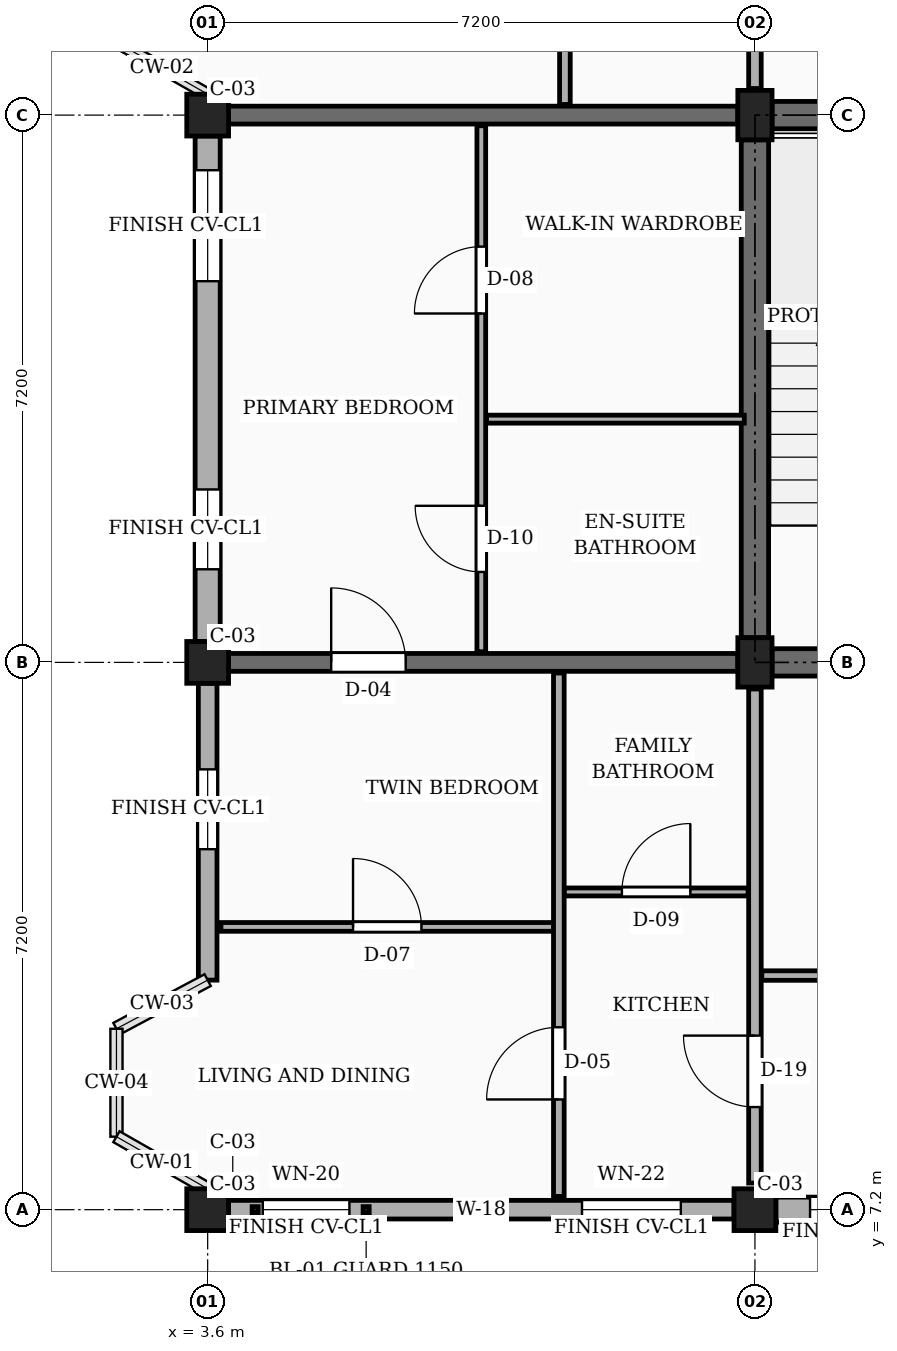
"""IFC4 building model, lengths in metres.
Left out: names, types, materials, properties, quantities, classifications, styles, units other than length and angle.
Written with IfcOpenShell. Run it as: python <this file> out.ifc"""

import sys

from ifc_helpers import new_model, si_unit, direction, frame, frame_2d, origin, origin_2d, place, context, subcontext, project, spatial, rectangle, extrude, element, fill, save


model = new_model("IFC4")
c1 = context("Model", 3, precision=1e-05, world=origin(), true_north=direction((0.0, 1.0)))
c2 = subcontext(c1, "Body", "Model", "MODEL_VIEW")
j1 = project(units=[si_unit("LENGTHUNIT", "METRE"), si_unit("PLANEANGLEUNIT", "RADIAN")], contexts=[c1])
p1 = place(None, origin())
s1 = spatial("IfcSite", under=j1, at=p1, CompositionType="ELEMENT")
p2 = place(p1, origin())
s2 = spatial("IfcBuilding", under=s1, at=p2, CompositionType="ELEMENT")
p3 = place(p2, frame((0.0, 0.0, 20.25)))
s3 = spatial("IfcBuildingStorey", under=s2, at=p3, CompositionType="ELEMENT", Elevation=20.25)
for number, where, z_axis, x_axis in (
    (1, (3.6, 7.2, 0.0), (0.0, 0.0, 1.0), (1.0, 0.0, 0.0)),
    (2, (3.6, 14.4, 0.0), (0.0, 0.0, 1.0), (1.0, 0.0, 0.0)),
    (3, (3.6, 21.6, 0.0), (0.0, 0.0, 1.0), (1.0, 0.0, 0.0)),
    (4, (10.8, 7.2, 0.0), (0.0, 0.0, 1.0), (1.0, 0.0, 0.0)),
):
    element("IfcColumn", number, at=place(p3, frame(where, z_axis=z_axis, x_axis=x_axis)), inside=s3, PredefinedType="COLUMN", context=c2, shape_type="SweptSolid", body=[
        extrude(rectangle(XDim=0.55, YDim=0.55, at=origin_2d()), origin(), (0.0, 0.0, 1.0), 3.15),
    ])
for number, where, z_axis, x_axis in (
    (5, (10.8, 14.4, 0.0), (0.0, 0.0, 1.0), (1.0, 0.0, 0.0)),
    (6, (10.8, 21.6, 0.0), (0.0, 0.0, 1.0), (1.0, 0.0, 0.0)),
):
    element("IfcColumn", number, at=place(p3, frame(where, z_axis=z_axis, x_axis=x_axis)), inside=s3, PredefinedType="COLUMN", context=c2, shape_type="SweptSolid", body=[
        extrude(rectangle(XDim=0.45, YDim=0.65, at=origin_2d()), origin(), (0.0, 0.0, 1.0), 3.15),
    ])
p4 = place(p3, frame((3.875, 14.4, 0.0), z_axis=(0.0, 0.0, 1.0), x_axis=(1.0, 0.0, 0.0)))
e7 = element("IfcWall", 7, at=p4, inside=s3, PredefinedType="SOLIDWALL", context=c2, shape_type="SweptSolid", body=[
    extrude(rectangle(XDim=6.7, YDim=0.235, at=frame_2d((3.35, 0.0))), origin(), (0.0, 0.0, 1.0), 2.17),
])
p5 = place(p4, frame((1.35, 0.0, 0.0)))
e8 = element("IfcOpeningElement", 8, at=p5, cuts=e7, PredefinedType="OPENING", context=c2, shape_type="SweptSolid", body=[
    extrude(rectangle(XDim=0.98, YDim=2.12, at=frame_2d((0.49, 1.06))), frame((0.0, 0.127, 0.0), z_axis=(0.0, -1.0, 0.0), x_axis=(1.0, 0.0, 0.0)), (0.0, 0.0, 1.0), 0.255),
])
p6 = place(p3, frame((3.875, 21.6, 0.0), z_axis=(0.0, 0.0, 1.0), x_axis=(1.0, 0.0, 0.0)))
e9 = element("IfcWall", 9, at=p6, inside=s3, PredefinedType="SOLIDWALL", context=c2, shape_type="SweptSolid", body=[
    extrude(rectangle(XDim=6.7, YDim=0.235, at=frame_2d((3.35, 0.0))), origin(), (0.0, 0.0, 1.0), 2.17),
])
p7 = place(p3, frame((3.875, 7.2, 0.0), z_axis=(0.0, 0.0, 1.0), x_axis=(1.0, 0.0, 0.0)))
e10 = element("IfcWall", 10, at=p7, inside=s3, PredefinedType="SOLIDWALL", context=c2, shape_type="SweptSolid", body=[
    extrude(rectangle(XDim=6.65, YDim=0.245, at=frame_2d((3.325, 0.0))), origin(), (0.0, 0.0, 1.0), 2.44),
])
p8 = place(p7, frame((0.45, 0.0, 0.78)))
e11 = element("IfcOpeningElement", 11, at=p8, cuts=e10, PredefinedType="OPENING", context=c2, shape_type="SweptSolid", body=[
    extrude(rectangle(XDim=1.14, YDim=1.36, at=frame_2d((0.57, 0.68))), frame((0.0, 0.133, 0.0), z_axis=(0.0, -1.0, 0.0), x_axis=(1.0, 0.0, 0.0)), (0.0, 0.0, 1.0), 0.265),
])
p9 = place(p7, frame((4.65, 0.0, 0.78)))
e12 = element("IfcOpeningElement", 12, at=p9, cuts=e10, PredefinedType="OPENING", context=c2, shape_type="SweptSolid", body=[
    extrude(rectangle(XDim=1.3, YDim=1.36, at=frame_2d((0.65, 0.68))), frame((0.0, 0.133, 0.0), z_axis=(0.0, -1.0, 0.0), x_axis=(1.0, 0.0, 0.0)), (0.0, 0.0, 1.0), 0.265),
])
p10 = place(p3, frame((11.075, 7.2, 0.0), z_axis=(0.0, 0.0, 1.0), x_axis=(1.0, 0.0, 0.0)))
e13 = element("IfcWall", 13, at=p10, inside=s3, PredefinedType="SOLIDWALL", context=c2, shape_type="SweptSolid", body=[
    extrude(rectangle(XDim=6.65, YDim=0.33, at=frame_2d((3.325, 0.0))), origin(), (0.0, 0.0, 1.0), 2.44),
])
p11 = place(p10, frame((0.45, 0.0, 0.78)))
e14 = element("IfcOpeningElement", 14, at=p11, cuts=e13, PredefinedType="OPENING", context=c2, shape_type="SweptSolid", body=[
    extrude(rectangle(XDim=1.3, YDim=1.36, at=frame_2d((0.65, 0.68))), frame((0.0, 0.175, 0.0), z_axis=(0.0, -1.0, 0.0), x_axis=(1.0, 0.0, 0.0)), (0.0, 0.0, 1.0), 0.35),
])
p12 = place(p10, frame((4.65, 0.0, 0.78)))
e15 = element("IfcOpeningElement", 15, at=p12, cuts=e13, PredefinedType="OPENING", context=c2, shape_type="SweptSolid", body=[
    extrude(rectangle(XDim=1.46, YDim=1.36, at=frame_2d((0.73, 0.68))), frame((0.0, 0.175, 0.0), z_axis=(0.0, -1.0, 0.0), x_axis=(1.0, 0.0, 0.0)), (0.0, 0.0, 1.0), 0.35),
])
p13 = place(p3, frame((3.6, 21.325, 0.0), z_axis=(0.0, 0.0, 1.0), x_axis=(0.0, -1.0, 0.0)))
e16 = element("IfcWall", 16, at=p13, inside=s3, PredefinedType="SOLIDWALL", context=c2, shape_type="SweptSolid", body=[
    extrude(rectangle(XDim=6.65, YDim=0.33, at=frame_2d((3.325, 0.0))), origin(), (0.0, 0.0, 1.0), 2.44),
])
p14 = place(p13, frame((0.45, 0.0, 0.78)))
e17 = element("IfcOpeningElement", 17, at=p14, cuts=e16, PredefinedType="OPENING", context=c2, shape_type="SweptSolid", body=[
    extrude(rectangle(XDim=1.46, YDim=1.36, at=frame_2d((0.73, 0.68))), frame((0.0, 0.175, 0.0), z_axis=(0.0, -1.0, 0.0), x_axis=(1.0, 0.0, 0.0)), (0.0, 0.0, 1.0), 0.35),
])
p15 = place(p13, frame((4.65, 0.0, 0.78)))
e18 = element("IfcOpeningElement", 18, at=p15, cuts=e16, PredefinedType="OPENING", context=c2, shape_type="SweptSolid", body=[
    extrude(rectangle(XDim=1.05, YDim=1.44, at=frame_2d((0.525, 0.72))), frame((0.0, 0.175, 0.0), z_axis=(0.0, -1.0, 0.0), x_axis=(1.0, 0.0, 0.0)), (0.0, 0.0, 1.0), 0.35),
])
p16 = place(p3, frame((3.6, 14.125, 0.0), z_axis=(0.0, 0.0, 1.0), x_axis=(0.0, -1.0, 0.0)))
e19 = element("IfcWall", 19, at=p16, inside=s3, PredefinedType="SOLIDWALL", context=c2, shape_type="SweptSolid", body=[
    extrude(rectangle(XDim=3.905, YDim=0.245, at=frame_2d((1.953, 0.0))), origin(), (0.0, 0.0, 1.0), 2.44),
])
p17 = place(p16, frame((1.133, 0.0, 0.78)))
e20 = element("IfcOpeningElement", 20, at=p17, cuts=e19, PredefinedType="OPENING", context=c2, shape_type="SweptSolid", body=[
    extrude(rectangle(XDim=1.05, YDim=1.44, at=frame_2d((0.525, 0.72))), frame((0.0, 0.133, 0.0), z_axis=(0.0, -1.0, 0.0), x_axis=(1.0, 0.0, 0.0)), (0.0, 0.0, 1.0), 0.265),
])
p18 = place(p3, frame((10.8, 14.725, 0.0), z_axis=(0.0, 0.0, 1.0), x_axis=(0.0, 1.0, 0.0)))
e21 = element("IfcWall", 21, at=p18, inside=s3, PredefinedType="SHEAR", context=c2, shape_type="SweptSolid", body=[
    extrude(rectangle(XDim=6.55, YDim=0.36, at=frame_2d((3.275, 0.0))), origin(), (0.0, 0.0, 1.0), 2.87),
])
for number, where, z_axis, x_axis in (
    (22, (11.025, 21.6, 0.0), (0.0, 0.0, 1.0), (1.0, 0.0, 0.0)),
    (23, (11.025, 14.4, 0.0), (0.0, 0.0, 1.0), (1.0, 0.0, 0.0)),
):
    element("IfcWall", number, at=place(p3, frame(where, z_axis=z_axis, x_axis=x_axis)), inside=s3, PredefinedType="SHEAR", context=c2, shape_type="SweptSolid", body=[
        extrude(rectangle(XDim=6.75, YDim=0.36, at=frame_2d((3.375, 0.0))), origin(), (0.0, 0.0, 1.0), 2.87),
    ])
p19 = place(p3, frame((10.8, 7.55, 0.0), z_axis=(0.0, 0.0, 1.0), x_axis=(0.0, 1.0, 0.0)))
e24 = element("IfcWall", 24, at=p19, inside=s3, PredefinedType="PARTITIONING", context=c2, shape_type="SweptSolid", body=[
    extrude(rectangle(XDim=6.5, YDim=0.165, at=frame_2d((3.25, 0.0))), origin(), (0.0, 0.0, 1.0), 2.305),
])
p20 = place(p19, frame((1.0, 0.0, 0.0)))
e25 = element("IfcOpeningElement", 25, at=p20, cuts=e24, PredefinedType="OPENING", context=c2, shape_type="SweptSolid", body=[
    extrude(rectangle(XDim=0.94, YDim=2.12, at=frame_2d((0.47, 1.06))), frame((0.0, 0.093, 0.0), z_axis=(0.0, -1.0, 0.0), x_axis=(1.0, 0.0, 0.0)), (0.0, 0.0, 1.0), 0.185),
])
p21 = place(p3, frame((10.8, 21.95, 0.0), z_axis=(0.0, 0.0, 1.0), x_axis=(0.0, 1.0, 0.0)))
e26 = element("IfcWall", 26, at=p21, inside=s3, PredefinedType="PARTITIONING", context=c2, shape_type="SweptSolid", body=[
    extrude(rectangle(XDim=6.5, YDim=0.165, at=frame_2d((3.25, 0.0))), origin(), (0.0, 0.0, 1.0), 2.305),
])
p22 = place(p21, frame((1.0, 0.0, 0.0)))
e27 = element("IfcOpeningElement", 27, at=p22, cuts=e26, PredefinedType="OPENING", context=c2, shape_type="SweptSolid", body=[
    extrude(rectangle(XDim=1.14, YDim=2.18, at=frame_2d((0.57, 1.09))), frame((0.0, 0.093, 0.0), z_axis=(0.0, -1.0, 0.0), x_axis=(1.0, 0.0, 0.0)), (0.0, 0.0, 1.0), 0.185),
])
p23 = place(p3, frame((10.89, 10.28, 0.0), z_axis=(0.0, 0.0, 1.0), x_axis=(1.0, 0.0, 0.0)))
e28 = element("IfcWall", 28, at=p23, inside=s3, PredefinedType="PARTITIONING", context=c2, shape_type="SweptSolid", body=[
    extrude(rectangle(XDim=7.02, YDim=0.125, at=frame_2d((3.51, 0.0))), origin(), (0.0, 0.0, 1.0), 2.305),
])
p24 = place(p23, frame((2.85, 0.0, 0.0)))
e29 = element("IfcOpeningElement", 29, at=p24, cuts=e28, PredefinedType="OPENING", context=c2, shape_type="SweptSolid", body=[
    extrude(rectangle(XDim=1.02, YDim=2.15, at=frame_2d((0.51, 1.075))), frame((0.0, 0.073, 0.0), z_axis=(0.0, -1.0, 0.0), x_axis=(1.0, 0.0, 0.0)), (0.0, 0.0, 1.0), 0.145),
])
p25 = place(p3, frame((3.775, 10.92, 0.0), z_axis=(0.0, 0.0, 1.0), x_axis=(1.0, 0.0, 0.0)))
e30 = element("IfcWall", 30, at=p25, inside=s3, PredefinedType="PARTITIONING", context=c2, shape_type="SweptSolid", body=[
    extrude(rectangle(XDim=4.375, YDim=0.115, at=frame_2d((2.188, 0.0))), origin(), (0.0, 0.0, 1.0), 2.305),
])
p26 = place(p25, frame((1.738, 0.0, 0.0)))
e31 = element("IfcOpeningElement", 31, at=p26, cuts=e30, PredefinedType="OPENING", context=c2, shape_type="SweptSolid", body=[
    extrude(rectangle(XDim=0.9, YDim=2.1, at=frame_2d((0.45, 1.05))), frame((0.0, 0.067, 0.0), z_axis=(0.0, -1.0, 0.0), x_axis=(1.0, 0.0, 0.0)), (0.0, 0.0, 1.0), 0.135),
])
p27 = place(p3, frame((8.29, 11.38, 0.0), z_axis=(0.0, 0.0, 1.0), x_axis=(1.0, 0.0, 0.0)))
e32 = element("IfcWall", 32, at=p27, inside=s3, PredefinedType="PARTITIONING", context=c2, shape_type="SweptSolid", body=[
    extrude(rectangle(XDim=2.42, YDim=0.105, at=frame_2d((1.21, 0.0))), origin(), (0.0, 0.0, 1.0), 2.305),
])
p28 = place(p27, frame((0.76, 0.0, 0.0)))
e33 = element("IfcOpeningElement", 33, at=p28, cuts=e32, PredefinedType="OPENING", context=c2, shape_type="SweptSolid", body=[
    extrude(rectangle(XDim=0.9, YDim=2.05, at=frame_2d((0.45, 1.025))), frame((0.0, 0.062, 0.0), z_axis=(0.0, -1.0, 0.0), x_axis=(1.0, 0.0, 0.0)), (0.0, 0.0, 1.0), 0.125),
])
p29 = place(p3, frame((8.22, 7.375, 0.0), z_axis=(0.0, 0.0, 1.0), x_axis=(0.0, 1.0, 0.0)))
e34 = element("IfcWall", 34, at=p29, inside=s3, PredefinedType="PARTITIONING", context=c2, shape_type="SweptSolid", body=[
    extrude(rectangle(XDim=6.885, YDim=0.14, at=frame_2d((3.442, 0.0))), origin(), (0.0, 0.0, 1.0), 2.305),
])
p30 = place(p29, frame((1.275, 0.0, 0.0)))
e35 = element("IfcOpeningElement", 35, at=p30, cuts=e34, PredefinedType="OPENING", context=c2, shape_type="SweptSolid", body=[
    extrude(rectangle(XDim=0.95, YDim=2.1, at=frame_2d((0.475, 1.05))), frame((0.0, 0.08, 0.0), z_axis=(0.0, -1.0, 0.0), x_axis=(1.0, 0.0, 0.0)), (0.0, 0.0, 1.0), 0.16),
])
p31 = place(p3, frame((7.2, 14.54, 0.0), z_axis=(0.0, 0.0, 1.0), x_axis=(0.0, 1.0, 0.0)))
e36 = element("IfcWall", 36, at=p31, inside=s3, PredefinedType="PARTITIONING", context=c2, shape_type="SweptSolid", body=[
    extrude(rectangle(XDim=6.92, YDim=0.115, at=frame_2d((3.46, 0.0))), origin(), (0.0, 0.0, 1.0), 2.305),
])
p32 = place(p31, frame((1.05, 0.0, 0.0)))
e37 = element("IfcOpeningElement", 37, at=p32, cuts=e36, PredefinedType="OPENING", context=c2, shape_type="SweptSolid", body=[
    extrude(rectangle(XDim=0.87, YDim=2.05, at=frame_2d((0.435, 1.025))), frame((0.0, 0.067, 0.0), z_axis=(0.0, -1.0, 0.0), x_axis=(1.0, 0.0, 0.0)), (0.0, 0.0, 1.0), 0.135),
])
p33 = place(p31, frame((4.45, 0.0, 0.0)))
e38 = element("IfcOpeningElement", 38, at=p33, cuts=e36, PredefinedType="OPENING", context=c2, shape_type="SweptSolid", body=[
    extrude(rectangle(XDim=0.88, YDim=2.08, at=frame_2d((0.44, 1.04))), frame((0.0, 0.067, 0.0), z_axis=(0.0, -1.0, 0.0), x_axis=(1.0, 0.0, 0.0)), (0.0, 0.0, 1.0), 0.135),
])
p34 = place(p3, frame((7.27, 17.6, 0.0), z_axis=(0.0, 0.0, 1.0), x_axis=(1.0, 0.0, 0.0)))
e39 = element("IfcWall", 39, at=p34, inside=s3, PredefinedType="PARTITIONING", context=c2, shape_type="SweptSolid", body=[
    extrude(rectangle(XDim=3.39, YDim=0.105, at=frame_2d((1.695, 0.0))), origin(), (0.0, 0.0, 1.0), 2.305),
])
p35 = place(p3, frame((8.3, 21.74, 0.0), z_axis=(0.0, 0.0, 1.0), x_axis=(0.0, 1.0, 0.0)))
e40 = element("IfcWall", 40, at=p35, inside=s3, PredefinedType="PARTITIONING", context=c2, shape_type="SweptSolid", body=[
    extrude(rectangle(XDim=6.92, YDim=0.14, at=frame_2d((3.46, 0.0))), origin(), (0.0, 0.0, 1.0), 2.305),
])
p36 = place(p35, frame((1.31, 0.0, 0.0)))
e41 = element("IfcOpeningElement", 41, at=p36, cuts=e40, PredefinedType="OPENING", context=c2, shape_type="SweptSolid", body=[
    extrude(rectangle(XDim=0.95, YDim=2.1, at=frame_2d((0.475, 1.05))), frame((0.0, 0.08, 0.0), z_axis=(0.0, -1.0, 0.0), x_axis=(1.0, 0.0, 0.0)), (0.0, 0.0, 1.0), 0.16),
])
p37 = place(p8, origin())
e42 = element("IfcWindow", 42, at=p37, inside=s3, PartitioningType="SINGLE_PANEL", PredefinedType="WINDOW", context=c2, shape_type="SweptSolid", body=[
    extrude(rectangle(XDim=1.14, YDim=1.36, at=frame_2d((0.57, 0.68))), frame((0.0, 0.03, 0.0), z_axis=(0.0, -1.0, 0.0), x_axis=(1.0, 0.0, 0.0)), (0.0, 0.0, 1.0), 0.06),
])
fill(e11, e42)
p38 = place(p9, origin())
e43 = element("IfcWindow", 43, at=p38, inside=s3, PartitioningType="SINGLE_PANEL", PredefinedType="WINDOW", context=c2, shape_type="SweptSolid", body=[
    extrude(rectangle(XDim=1.3, YDim=1.36, at=frame_2d((0.65, 0.68))), frame((0.0, 0.03, 0.0), z_axis=(0.0, -1.0, 0.0), x_axis=(1.0, 0.0, 0.0)), (0.0, 0.0, 1.0), 0.06),
])
fill(e12, e43)
p39 = place(p11, origin())
e44 = element("IfcWindow", 44, at=p39, inside=s3, PartitioningType="SINGLE_PANEL", PredefinedType="WINDOW", context=c2, shape_type="SweptSolid", body=[
    extrude(rectangle(XDim=1.3, YDim=1.36, at=frame_2d((0.65, 0.68))), frame((0.0, 0.03, 0.0), z_axis=(0.0, -1.0, 0.0), x_axis=(1.0, 0.0, 0.0)), (0.0, 0.0, 1.0), 0.06),
])
fill(e14, e44)
p40 = place(p14, origin())
e45 = element("IfcWindow", 45, at=p40, inside=s3, PartitioningType="SINGLE_PANEL", PredefinedType="WINDOW", context=c2, shape_type="SweptSolid", body=[
    extrude(rectangle(XDim=1.46, YDim=1.36, at=frame_2d((0.73, 0.68))), frame((0.0, 0.03, 0.0), z_axis=(0.0, -1.0, 0.0), x_axis=(1.0, 0.0, 0.0)), (0.0, 0.0, 1.0), 0.06),
])
fill(e17, e45)
p41 = place(p15, origin())
e46 = element("IfcWindow", 46, at=p41, inside=s3, PartitioningType="SINGLE_PANEL", PredefinedType="WINDOW", context=c2, shape_type="SweptSolid", body=[
    extrude(rectangle(XDim=1.05, YDim=1.44, at=frame_2d((0.525, 0.72))), frame((0.0, 0.03, 0.0), z_axis=(0.0, -1.0, 0.0), x_axis=(1.0, 0.0, 0.0)), (0.0, 0.0, 1.0), 0.06),
])
fill(e18, e46)
p42 = place(p17, origin())
e47 = element("IfcWindow", 47, at=p42, inside=s3, PartitioningType="SINGLE_PANEL", PredefinedType="WINDOW", context=c2, shape_type="SweptSolid", body=[
    extrude(rectangle(XDim=1.05, YDim=1.44, at=frame_2d((0.525, 0.72))), frame((0.0, 0.03, 0.0), z_axis=(0.0, -1.0, 0.0), x_axis=(1.0, 0.0, 0.0)), (0.0, 0.0, 1.0), 0.06),
])
fill(e20, e47)
p43 = place(p20, origin())
e48 = element("IfcDoor", 48, at=p43, inside=s3, OperationType="SINGLE_SWING_RIGHT", PredefinedType="DOOR", context=c2, shape_type="SweptSolid", body=[
    extrude(rectangle(XDim=0.94, YDim=2.12, at=frame_2d((0.47, 1.06))), frame((0.0, 0.025, 0.0), z_axis=(0.0, -1.0, 0.0), x_axis=(1.0, 0.0, 0.0)), (0.0, 0.0, 1.0), 0.05),
])
fill(e25, e48)
p44 = place(p26, origin())
e49 = element("IfcDoor", 49, at=p44, inside=s3, OperationType="SINGLE_SWING_LEFT", PredefinedType="DOOR", context=c2, shape_type="SweptSolid", body=[
    extrude(rectangle(XDim=0.9, YDim=2.1, at=frame_2d((0.45, 1.05))), frame((0.0, 0.025, 0.0), z_axis=(0.0, -1.0, 0.0), x_axis=(1.0, 0.0, 0.0)), (0.0, 0.0, 1.0), 0.05),
])
fill(e31, e49)
p45 = place(p28, origin())
e50 = element("IfcDoor", 50, at=p45, inside=s3, OperationType="SINGLE_SWING_RIGHT", PredefinedType="DOOR", context=c2, shape_type="SweptSolid", body=[
    extrude(rectangle(XDim=0.9, YDim=2.05, at=frame_2d((0.45, 1.025))), frame((0.0, 0.025, 0.0), z_axis=(0.0, -1.0, 0.0), x_axis=(1.0, 0.0, 0.0)), (0.0, 0.0, 1.0), 0.05),
])
fill(e33, e50)
p46 = place(p30, origin())
e51 = element("IfcDoor", 51, at=p46, inside=s3, OperationType="SINGLE_SWING_LEFT", PredefinedType="DOOR", context=c2, shape_type="SweptSolid", body=[
    extrude(rectangle(XDim=0.95, YDim=2.1, at=frame_2d((0.475, 1.05))), frame((0.0, 0.025, 0.0), z_axis=(0.0, -1.0, 0.0), x_axis=(1.0, 0.0, 0.0)), (0.0, 0.0, 1.0), 0.05),
])
fill(e35, e51)
p47 = place(p32, origin())
e52 = element("IfcDoor", 52, at=p47, inside=s3, OperationType="SINGLE_SWING_RIGHT", PredefinedType="DOOR", context=c2, shape_type="SweptSolid", body=[
    extrude(rectangle(XDim=0.87, YDim=2.05, at=frame_2d((0.435, 1.025))), frame((0.0, 0.025, 0.0), z_axis=(0.0, -1.0, 0.0), x_axis=(1.0, 0.0, 0.0)), (0.0, 0.0, 1.0), 0.05),
])
fill(e37, e52)
p48 = place(p33, origin())
e53 = element("IfcDoor", 53, at=p48, inside=s3, OperationType="SINGLE_SWING_LEFT", PredefinedType="DOOR", context=c2, shape_type="SweptSolid", body=[
    extrude(rectangle(XDim=0.88, YDim=2.08, at=frame_2d((0.44, 1.04))), frame((0.0, 0.025, 0.0), z_axis=(0.0, -1.0, 0.0), x_axis=(1.0, 0.0, 0.0)), (0.0, 0.0, 1.0), 0.05),
])
fill(e38, e53)
p49 = place(p5, origin())
e54 = element("IfcDoor", 54, at=p49, inside=s3, OperationType="SINGLE_SWING_LEFT", PredefinedType="DOOR", context=c2, shape_type="SweptSolid", body=[
    extrude(rectangle(XDim=0.98, YDim=2.12, at=frame_2d((0.49, 1.06))), frame((0.0, 0.025, 0.0), z_axis=(0.0, -1.0, 0.0), x_axis=(1.0, 0.0, 0.0)), (0.0, 0.0, 1.0), 0.05),
])
fill(e8, e54)
save(model, sys.argv[1])
